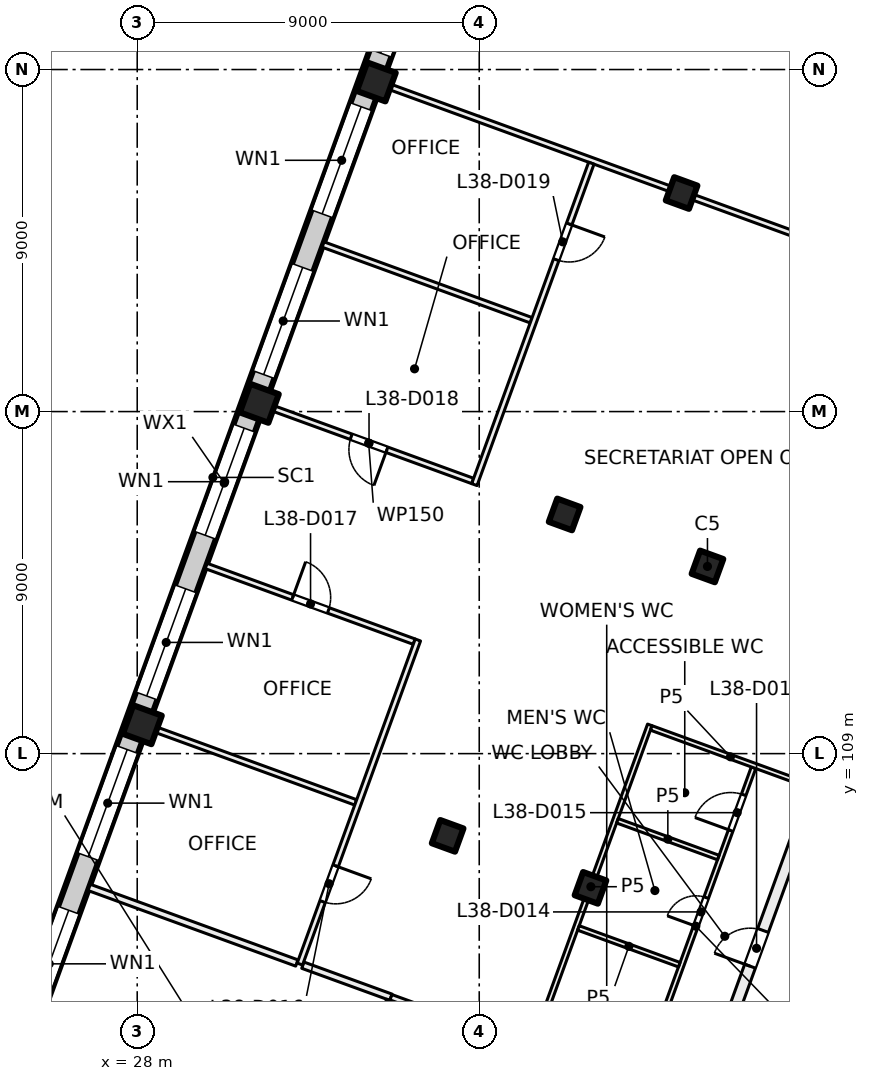
"""IFC4 building model, lengths in metres.
Left out: names, types, materials, properties, quantities, classifications, styles, units other than length and angle.
Written with IfcOpenShell. Run it as: python <this file> out.ifc"""

import sys

from ifc_helpers import new_model, si_unit, direction, frame, frame_2d, origin, origin_2d, place, context, subcontext, project, spatial, rectangle, extrude, element, fill, save


model = new_model("IFC4")
c1 = context("Model", 3, precision=1e-05, world=origin(), true_north=direction((0.0, 1.0)))
c2 = subcontext(c1, "Body", "Model", "MODEL_VIEW")
j1 = project(units=[si_unit("LENGTHUNIT", "METRE"), si_unit("PLANEANGLEUNIT", "RADIAN")], contexts=[c1])
p1 = place(None, origin())
s1 = spatial("IfcSite", under=j1, at=p1, CompositionType="ELEMENT")
p2 = place(p1, origin())
s2 = spatial("IfcBuilding", under=s1, at=p2, CompositionType="ELEMENT")
p3 = place(p2, frame((0.0, 0.0, 162.5)))
s3 = spatial("IfcBuildingStorey", under=s2, at=p3, CompositionType="ELEMENT", Elevation=162.5)
for number, where, z_axis, x_axis in (
    (1, (43.006, 113.925, 0.0), (0.0, 0.0, 1.0), (-0.342, -0.94, 0.0)),
    (2, (39.927, 105.468, 0.0), (0.0, 0.0, 1.0), (-0.342, -0.94, 0.0)),
    (3, (42.325, 123.751, 0.0), (0.0, 0.0, 1.0), (-0.342, -0.94, 0.0)),
    (4, (39.247, 115.293, 0.0), (0.0, 0.0, 1.0), (-0.342, -0.94, 0.0)),
    (5, (36.169, 106.836, 0.0), (0.0, 0.0, 1.0), (-0.342, -0.94, 0.0)),
):
    element("IfcColumn", number, at=place(p3, frame(where, z_axis=z_axis, x_axis=x_axis)), inside=s3, PredefinedType="COLUMN", context=c2, shape_type="SweptSolid", body=[
        extrude(rectangle(XDim=0.65, YDim=0.65, at=origin_2d()), origin(), (0.0, 0.0, 1.0), 4.0),
    ])
for number, where, z_axis, x_axis in (
    (6, (34.291, 126.675, 0.0), (0.0, 0.0, 1.0), (-0.342, -0.94, 0.0)),
    (7, (31.212, 118.218, 0.0), (0.0, 0.0, 1.0), (-0.342, -0.94, 0.0)),
    (8, (28.134, 109.76, 0.0), (0.0, 0.0, 1.0), (-0.342, -0.94, 0.0)),
):
    element("IfcColumn", number, at=place(p3, frame(where, z_axis=z_axis, x_axis=x_axis)), inside=s3, PredefinedType="COLUMN", context=c2, shape_type="SweptSolid", body=[
        extrude(rectangle(XDim=0.8, YDim=0.8, at=origin_2d()), origin(), (0.0, 0.0, 1.0), 4.0),
    ])
p4 = place(p3, frame((52.212, 113.783, 0.0), z_axis=(0.0, 0.0, 1.0), x_axis=(-0.34202521188, -0.939690775968, 0.0)))
e9 = element("IfcWall", 9, at=p4, inside=s3, PredefinedType="SOLIDWALL", context=c2, shape_type="SweptSolid", body=[
    extrude(rectangle(XDim=21.745, YDim=0.6, at=frame_2d((10.873, 0.0))), origin(), (0.0, 0.0, 1.0), 3.625),
])
p5 = place(p4, frame((3.765, 0.0, 0.9)))
e10 = element("IfcOpeningElement", 10, at=p5, cuts=e9, PredefinedType="OPENING", context=c2, shape_type="SweptSolid", body=[
    extrude(rectangle(XDim=3.0, YDim=2.4, at=frame_2d((1.5, 1.2))), frame((0.0, 0.31, 0.0), z_axis=(0.0, -1.0, 0.0), x_axis=(1.0, 0.0, 0.0)), (0.0, 0.0, 1.0), 0.62),
])
p6 = place(p4, frame((8.265, 0.0, 0.9)))
e11 = element("IfcOpeningElement", 11, at=p6, cuts=e9, PredefinedType="OPENING", context=c2, shape_type="SweptSolid", body=[
    extrude(rectangle(XDim=3.0, YDim=2.4, at=frame_2d((1.5, 1.2))), frame((0.0, 0.31, 0.0), z_axis=(0.0, -1.0, 0.0), x_axis=(1.0, 0.0, 0.0)), (0.0, 0.0, 1.0), 0.62),
])
p7 = place(p4, frame((12.765, 0.0, 0.9)))
e12 = element("IfcOpeningElement", 12, at=p7, cuts=e9, PredefinedType="OPENING", context=c2, shape_type="SweptSolid", body=[
    extrude(rectangle(XDim=3.0, YDim=2.4, at=frame_2d((1.5, 1.2))), frame((0.0, 0.31, 0.0), z_axis=(0.0, -1.0, 0.0), x_axis=(1.0, 0.0, 0.0)), (0.0, 0.0, 1.0), 0.62),
])
p8 = place(p4, frame((17.265, 0.0, 0.9)))
e13 = element("IfcOpeningElement", 13, at=p8, cuts=e9, PredefinedType="OPENING", context=c2, shape_type="SweptSolid", body=[
    extrude(rectangle(XDim=3.0, YDim=2.4, at=frame_2d((1.5, 1.2))), frame((0.0, 0.31, 0.0), z_axis=(0.0, -1.0, 0.0), x_axis=(1.0, 0.0, 0.0)), (0.0, 0.0, 1.0), 0.62),
])
p9 = place(p3, frame((24.666, 100.669, 0.0), z_axis=(0.0, 0.0, 1.0), x_axis=(0.34201964167, 0.939692803373, 0.0)))
e14 = element("IfcWall", 14, at=p9, inside=s3, PredefinedType="SOLIDWALL", context=c2, shape_type="SweptSolid", body=[
    extrude(rectangle(XDim=32.884, YDim=0.6, at=frame_2d((16.442, 0.0))), origin(), (0.0, 0.0, 1.0), 3.625),
])
p10 = place(p9, frame((1.48, 0.0, 0.9)))
e15 = element("IfcOpeningElement", 15, at=p10, cuts=e14, PredefinedType="OPENING", context=c2, shape_type="SweptSolid", body=[
    extrude(rectangle(XDim=3.0, YDim=2.4, at=frame_2d((1.5, 1.2))), frame((0.0, 0.31, 0.0), z_axis=(0.0, -1.0, 0.0), x_axis=(1.0, 0.0, 0.0)), (0.0, 0.0, 1.0), 0.62),
])
p11 = place(p9, frame((5.98, 0.0, 0.9)))
e16 = element("IfcOpeningElement", 16, at=p11, cuts=e14, PredefinedType="OPENING", context=c2, shape_type="SweptSolid", body=[
    extrude(rectangle(XDim=3.0, YDim=2.4, at=frame_2d((1.5, 1.2))), frame((0.0, 0.31, 0.0), z_axis=(0.0, -1.0, 0.0), x_axis=(1.0, 0.0, 0.0)), (0.0, 0.0, 1.0), 0.62),
])
p12 = place(p9, frame((10.48, 0.0, 0.9)))
e17 = element("IfcOpeningElement", 17, at=p12, cuts=e14, PredefinedType="OPENING", context=c2, shape_type="SweptSolid", body=[
    extrude(rectangle(XDim=3.0, YDim=2.4, at=frame_2d((1.5, 1.2))), frame((0.0, 0.31, 0.0), z_axis=(0.0, -1.0, 0.0), x_axis=(1.0, 0.0, 0.0)), (0.0, 0.0, 1.0), 0.62),
])
p13 = place(p9, frame((14.98, 0.0, 0.9)))
e18 = element("IfcOpeningElement", 18, at=p13, cuts=e14, PredefinedType="OPENING", context=c2, shape_type="SweptSolid", body=[
    extrude(rectangle(XDim=3.0, YDim=2.4, at=frame_2d((1.5, 1.2))), frame((0.0, 0.31, 0.0), z_axis=(0.0, -1.0, 0.0), x_axis=(1.0, 0.0, 0.0)), (0.0, 0.0, 1.0), 0.62),
])
p14 = place(p9, frame((19.48, 0.0, 0.9)))
e19 = element("IfcOpeningElement", 19, at=p14, cuts=e14, PredefinedType="OPENING", context=c2, shape_type="SweptSolid", body=[
    extrude(rectangle(XDim=3.0, YDim=2.4, at=frame_2d((1.5, 1.2))), frame((0.0, 0.31, 0.0), z_axis=(0.0, -1.0, 0.0), x_axis=(1.0, 0.0, 0.0)), (0.0, 0.0, 1.0), 0.62),
])
p15 = place(p9, frame((23.98, 0.0, 0.9)))
e20 = element("IfcOpeningElement", 20, at=p15, cuts=e14, PredefinedType="OPENING", context=c2, shape_type="SweptSolid", body=[
    extrude(rectangle(XDim=3.0, YDim=2.4, at=frame_2d((1.5, 1.2))), frame((0.0, 0.31, 0.0), z_axis=(0.0, -1.0, 0.0), x_axis=(1.0, 0.0, 0.0)), (0.0, 0.0, 1.0), 0.62),
])
p16 = place(p9, frame((28.48, 0.0, 0.9)))
e21 = element("IfcOpeningElement", 21, at=p16, cuts=e14, PredefinedType="OPENING", context=c2, shape_type="SweptSolid", body=[
    extrude(rectangle(XDim=3.0, YDim=2.4, at=frame_2d((1.5, 1.2))), frame((0.0, 0.31, 0.0), z_axis=(0.0, -1.0, 0.0), x_axis=(1.0, 0.0, 0.0)), (0.0, 0.0, 1.0), 0.62),
])
p17 = place(p3, frame((26.736, 105.48, 0.0), z_axis=(0.0, 0.0, 1.0), x_axis=(0.939674453825, -0.342070052516, 0.0)))
e22 = element("IfcWall", 22, at=p17, inside=s3, PredefinedType="PARTITIONING", context=c2, shape_type="SweptSolid", body=[
    extrude(rectangle(XDim=5.815, YDim=0.175, at=frame_2d((2.907, 0.0))), origin(), (0.0, 0.0, 1.0), 3.625),
])
p18 = place(p3, frame((28.275, 109.709, 0.0), z_axis=(0.0, 0.0, 1.0), x_axis=(0.939718757431, -0.341948324943, 0.0)))
e23 = element("IfcWall", 23, at=p18, inside=s3, PredefinedType="PARTITIONING", context=c2, shape_type="SweptSolid", body=[
    extrude(rectangle(XDim=5.825, YDim=0.15, at=frame_2d((2.913, 0.0))), origin(), (0.0, 0.0, 1.0), 3.625),
])
p19 = place(p3, frame((29.814, 113.938, 0.0), z_axis=(0.0, 0.0, 1.0), x_axis=(0.939738354986, -0.341894463495, 0.0)))
e24 = element("IfcWall", 24, at=p19, inside=s3, PredefinedType="PARTITIONING", context=c2, shape_type="SweptSolid", body=[
    extrude(rectangle(XDim=5.826, YDim=0.15, at=frame_2d((2.913, 0.0))), origin(), (0.0, 0.0, 1.0), 3.625),
])
p20 = place(p19, frame((2.423, 0.0, 0.0)))
e25 = element("IfcOpeningElement", 25, at=p20, cuts=e24, PredefinedType="OPENING", context=c2, shape_type="SweptSolid", body=[
    extrude(rectangle(XDim=1.0, YDim=2.1, at=frame_2d((0.5, 1.05))), frame((0.0, 0.085, 0.0), z_axis=(0.0, -1.0, 0.0), x_axis=(1.0, 0.0, 0.0)), (0.0, 0.0, 1.0), 0.17),
])
p21 = place(p3, frame((32.359, 103.433, 0.0), z_axis=(0.0, 0.0, 1.0), x_axis=(0.939784753685, -0.341766904105, 0.0)))
e26 = element("IfcWall", 26, at=p21, inside=s3, PredefinedType="PARTITIONING", context=c2, shape_type="SweptSolid", body=[
    extrude(rectangle(XDim=2.467, YDim=0.175, at=frame_2d((1.233, 0.0))), origin(), (0.0, 0.0, 1.0), 3.625),
])
p22 = place(p3, frame((32.892, 122.395, 0.0), z_axis=(0.0, 0.0, 1.0), x_axis=(0.939733456466, -0.341907927371, 0.0)))
e27 = element("IfcWall", 27, at=p22, inside=s3, PredefinedType="PARTITIONING", context=c2, shape_type="SweptSolid", body=[
    extrude(rectangle(XDim=5.826, YDim=0.15, at=frame_2d((2.913, 0.0))), origin(), (0.0, 0.0, 1.0), 3.625),
])
p23 = place(p3, frame((34.431, 126.624, 0.0), z_axis=(0.0, 0.0, 1.0), x_axis=(0.939678226331, -0.342059689177, 0.0)))
e28 = element("IfcWall", 28, at=p23, inside=s3, PredefinedType="PARTITIONING", context=c2, shape_type="SweptSolid", body=[
    extrude(rectangle(XDim=16.901, YDim=0.15, at=frame_2d((8.45, 0.0))), origin(), (0.0, 0.0, 1.0), 3.625),
])
p24 = place(p3, frame((32.881, 97.657, 0.0), z_axis=(0.0, 0.0, 1.0), x_axis=(0.342058204353, 0.939678766832, 0.0)))
e29 = element("IfcWall", 29, at=p24, inside=s3, PredefinedType="PARTITIONING", context=c2, shape_type="SweptSolid", body=[
    extrude(rectangle(XDim=5.163, YDim=0.175, at=frame_2d((2.581, 0.0))), origin(), (0.0, 0.0, 1.0), 3.625),
])
p25 = place(p24, frame((1.991, 0.0, 0.0)))
e30 = element("IfcOpeningElement", 30, at=p25, cuts=e29, PredefinedType="OPENING", context=c2, shape_type="SweptSolid", body=[
    extrude(rectangle(XDim=1.2, YDim=2.1, at=frame_2d((0.6, 1.05))), frame((0.0, 0.097, 0.0), z_axis=(0.0, -1.0, 0.0), x_axis=(1.0, 0.0, 0.0)), (0.0, 0.0, 1.0), 0.195),
])
p26 = place(p3, frame((34.677, 102.59, 0.0), z_axis=(0.0, 0.0, 1.0), x_axis=(0.939712759945, -0.341964806371, 0.0)))
e31 = element("IfcWall", 31, at=p26, inside=s3, PredefinedType="PARTITIONING", context=c2, shape_type="SweptSolid", body=[
    extrude(rectangle(XDim=3.889, YDim=0.15, at=frame_2d((1.945, 0.0))), origin(), (0.0, 0.0, 1.0), 3.625),
])
p27 = place(p3, frame((35.385, 111.99, 0.0), z_axis=(0.0, 0.0, 1.0), x_axis=(-0.342153449842, -0.939644090473, 0.0)))
e32 = element("IfcWall", 32, at=p27, inside=s3, PredefinedType="PARTITIONING", context=c2, shape_type="SweptSolid", body=[
    extrude(rectangle(XDim=9.075, YDim=0.15, at=frame_2d((4.537, 0.0))), origin(), (0.0, 0.0, 1.0), 3.625),
])
p28 = place(p27, frame((6.325, 0.0, 0.0)))
e33 = element("IfcOpeningElement", 33, at=p28, cuts=e32, PredefinedType="OPENING", context=c2, shape_type="SweptSolid", body=[
    extrude(rectangle(XDim=1.0, YDim=2.1, at=frame_2d((0.5, 1.05))), frame((0.0, 0.085, 0.0), z_axis=(0.0, -1.0, 0.0), x_axis=(1.0, 0.0, 0.0)), (0.0, 0.0, 1.0), 0.17),
])
p29 = place(p3, frame((36.828, 116.174, 0.0), z_axis=(0.0, 0.0, 1.0), x_axis=(-0.939733456466, 0.341907927371, 0.0)))
e34 = element("IfcWall", 34, at=p29, inside=s3, PredefinedType="PARTITIONING", context=c2, shape_type="SweptSolid", body=[
    extrude(rectangle(XDim=5.826, YDim=0.15, at=frame_2d((2.913, 0.0))), origin(), (0.0, 0.0, 1.0), 3.625),
])
p30 = place(p29, frame((2.403, 0.0, 0.0)))
e35 = element("IfcOpeningElement", 35, at=p30, cuts=e34, PredefinedType="OPENING", context=c2, shape_type="SweptSolid", body=[
    extrude(rectangle(XDim=1.0, YDim=2.1, at=frame_2d((0.5, 1.05))), frame((0.0, 0.085, 0.0), z_axis=(0.0, -1.0, 0.0), x_axis=(1.0, 0.0, 0.0)), (0.0, 0.0, 1.0), 0.17),
])
p31 = place(p3, frame((39.95, 124.536, 0.0), z_axis=(0.0, 0.0, 1.0), x_axis=(-0.341963022424, -0.939713409128, 0.0)))
e36 = element("IfcWall", 36, at=p31, inside=s3, PredefinedType="PARTITIONING", context=c2, shape_type="SweptSolid", body=[
    extrude(rectangle(XDim=9.001, YDim=0.15, at=frame_2d((4.5, 0.0))), origin(), (0.0, 0.0, 1.0), 3.625),
])
p32 = place(p31, frame((1.703, 0.0, 0.0)))
e37 = element("IfcOpeningElement", 37, at=p32, cuts=e36, PredefinedType="OPENING", context=c2, shape_type="SweptSolid", body=[
    extrude(rectangle(XDim=1.0, YDim=2.1, at=frame_2d((0.5, 1.05))), frame((0.0, 0.085, 0.0), z_axis=(0.0, -1.0, 0.0), x_axis=(1.0, 0.0, 0.0)), (0.0, 0.0, 1.0), 0.17),
])
p33 = place(p3, frame((38.388, 101.24, 0.0), z_axis=(0.0, 0.0, 1.0), x_axis=(0.342067486799, 0.93967538782, 0.0)))
e38 = element("IfcWall", 38, at=p33, inside=s3, PredefinedType="PARTITIONING", context=c2, shape_type="SweptSolid", body=[
    extrude(rectangle(XDim=9.063, YDim=0.125, at=frame_2d((4.531, 0.0))), origin(), (0.0, 0.0, 1.0), 3.625),
])
p34 = place(p3, frame((41.181, 100.29, 0.0), z_axis=(0.0, 0.0, 1.0), x_axis=(0.34222012082, 0.939619810831, 0.0)))
e39 = element("IfcWall", 39, at=p34, inside=s3, PredefinedType="PARTITIONING", context=c2, shape_type="SweptSolid", body=[
    extrude(rectangle(XDim=8.875, YDim=0.125, at=frame_2d((4.438, 0.0))), origin(), (0.0, 0.0, 1.0), 3.625),
])
p35 = place(p34, frame((1.258, 0.0, 0.0)))
e40 = element("IfcOpeningElement", 40, at=p35, cuts=e39, PredefinedType="OPENING", context=c2, shape_type="SweptSolid", body=[
    extrude(rectangle(XDim=0.8, YDim=2.1, at=frame_2d((0.4, 1.05))), frame((0.0, 0.073, 0.0), z_axis=(0.0, -1.0, 0.0), x_axis=(1.0, 0.0, 0.0)), (0.0, 0.0, 1.0), 0.145),
])
p36 = place(p34, frame((4.437, 0.0, 0.0)))
e41 = element("IfcOpeningElement", 41, at=p36, cuts=e39, PredefinedType="OPENING", context=c2, shape_type="SweptSolid", body=[
    extrude(rectangle(XDim=0.8, YDim=2.1, at=frame_2d((0.4, 1.05))), frame((0.0, 0.073, 0.0), z_axis=(0.0, -1.0, 0.0), x_axis=(1.0, 0.0, 0.0)), (0.0, 0.0, 1.0), 0.145),
])
p37 = place(p34, frame((7.116, 0.0, 0.0)))
e42 = element("IfcOpeningElement", 42, at=p37, cuts=e39, PredefinedType="OPENING", context=c2, shape_type="SweptSolid", body=[
    extrude(rectangle(XDim=1.0, YDim=2.1, at=frame_2d((0.5, 1.05))), frame((0.0, 0.073, 0.0), z_axis=(0.0, -1.0, 0.0), x_axis=(1.0, 0.0, 0.0)), (0.0, 0.0, 1.0), 0.145),
])
p38 = place(p3, frame((41.526, 109.676, 0.0), z_axis=(0.0, 0.0, 1.0), x_axis=(0.939577975992, -0.342334963203, 0.0)))
e43 = element("IfcWall", 43, at=p38, inside=s3, PredefinedType="PARTITIONING", context=c2, shape_type="SweptSolid", body=[
    extrude(rectangle(XDim=4.437, YDim=0.125, at=frame_2d((2.219, 0.0))), origin(), (0.0, 0.0, 1.0), 3.625),
])
p39 = place(p3, frame((42.264, 103.446, 0.0), z_axis=(0.0, 0.0, 1.0), x_axis=(-0.939563555473, 0.342374539396, 0.0)))
e44 = element("IfcWall", 44, at=p39, inside=s3, PredefinedType="PARTITIONING", context=c2, shape_type="SweptSolid", body=[
    extrude(rectangle(XDim=2.824, YDim=0.125, at=frame_2d((1.412, 0.0))), origin(), (0.0, 0.0, 1.0), 3.625),
])
p40 = place(p3, frame((42.737, 99.59, 0.0), z_axis=(0.0, 0.0, 1.0), x_axis=(0.341992703977, 0.939702607438, 0.0)))
e45 = element("IfcWall", 45, at=p40, inside=s3, PredefinedType="PARTITIONING", context=c2, shape_type="SweptSolid", body=[
    extrude(rectangle(XDim=23.006, YDim=0.3, at=frame_2d((11.503, 0.0))), origin(), (0.0, 0.0, 1.0), 3.625),
])
p41 = place(p40, frame((4.062, 0.0, 0.0)))
e46 = element("IfcOpeningElement", 46, at=p41, cuts=e45, PredefinedType="OPENING", context=c2, shape_type="SweptSolid", body=[
    extrude(rectangle(XDim=1.0, YDim=2.1, at=frame_2d((0.5, 1.05))), frame((0.0, 0.16, 0.0), z_axis=(0.0, -1.0, 0.0), x_axis=(1.0, 0.0, 0.0)), (0.0, 0.0, 1.0), 0.32),
])
p42 = place(p40, frame((14.912, 0.0, 0.0)))
e47 = element("IfcOpeningElement", 47, at=p42, cuts=e45, PredefinedType="OPENING", context=c2, shape_type="SweptSolid", body=[
    extrude(rectangle(XDim=1.8, YDim=2.1, at=frame_2d((0.9, 1.05))), frame((0.0, 0.16, 0.0), z_axis=(0.0, -1.0, 0.0), x_axis=(1.0, 0.0, 0.0)), (0.0, 0.0, 1.0), 0.32),
])
p43 = place(p3, frame((43.29, 106.266, 0.0), z_axis=(0.0, 0.0, 1.0), x_axis=(-0.939601484935, 0.342270433294, 0.0)))
e48 = element("IfcWall", 48, at=p43, inside=s3, PredefinedType="PARTITIONING", context=c2, shape_type="SweptSolid", body=[
    extrude(rectangle(XDim=2.825, YDim=0.125, at=frame_2d((1.412, 0.0))), origin(), (0.0, 0.0, 1.0), 3.625),
])
p44 = place(p10, origin())
e49 = element("IfcWindow", 49, at=p44, inside=s3, PartitioningType="SINGLE_PANEL", PredefinedType="WINDOW", context=c2, shape_type="SweptSolid", body=[
    extrude(rectangle(XDim=3.0, YDim=2.4, at=frame_2d((1.5, 1.2))), frame((0.0, 0.03, 0.0), z_axis=(0.0, -1.0, 0.0), x_axis=(1.0, 0.0, 0.0)), (0.0, 0.0, 1.0), 0.06),
])
fill(e15, e49)
p45 = place(p11, origin())
e50 = element("IfcWindow", 50, at=p45, inside=s3, PartitioningType="SINGLE_PANEL", PredefinedType="WINDOW", context=c2, shape_type="SweptSolid", body=[
    extrude(rectangle(XDim=3.0, YDim=2.4, at=frame_2d((1.5, 1.2))), frame((0.0, 0.03, 0.0), z_axis=(0.0, -1.0, 0.0), x_axis=(1.0, 0.0, 0.0)), (0.0, 0.0, 1.0), 0.06),
])
fill(e16, e50)
p46 = place(p12, origin())
e51 = element("IfcWindow", 51, at=p46, inside=s3, PartitioningType="SINGLE_PANEL", PredefinedType="WINDOW", context=c2, shape_type="SweptSolid", body=[
    extrude(rectangle(XDim=3.0, YDim=2.4, at=frame_2d((1.5, 1.2))), frame((0.0, 0.03, 0.0), z_axis=(0.0, -1.0, 0.0), x_axis=(1.0, 0.0, 0.0)), (0.0, 0.0, 1.0), 0.06),
])
fill(e17, e51)
p47 = place(p13, origin())
e52 = element("IfcWindow", 52, at=p47, inside=s3, PartitioningType="SINGLE_PANEL", PredefinedType="WINDOW", context=c2, shape_type="SweptSolid", body=[
    extrude(rectangle(XDim=3.0, YDim=2.4, at=frame_2d((1.5, 1.2))), frame((0.0, 0.03, 0.0), z_axis=(0.0, -1.0, 0.0), x_axis=(1.0, 0.0, 0.0)), (0.0, 0.0, 1.0), 0.06),
])
fill(e18, e52)
p48 = place(p14, origin())
e53 = element("IfcWindow", 53, at=p48, inside=s3, PartitioningType="SINGLE_PANEL", PredefinedType="WINDOW", context=c2, shape_type="SweptSolid", body=[
    extrude(rectangle(XDim=3.0, YDim=2.4, at=frame_2d((1.5, 1.2))), frame((0.0, 0.03, 0.0), z_axis=(0.0, -1.0, 0.0), x_axis=(1.0, 0.0, 0.0)), (0.0, 0.0, 1.0), 0.06),
])
fill(e19, e53)
p49 = place(p15, origin())
e54 = element("IfcWindow", 54, at=p49, inside=s3, PartitioningType="SINGLE_PANEL", PredefinedType="WINDOW", context=c2, shape_type="SweptSolid", body=[
    extrude(rectangle(XDim=3.0, YDim=2.4, at=frame_2d((1.5, 1.2))), frame((0.0, 0.03, 0.0), z_axis=(0.0, -1.0, 0.0), x_axis=(1.0, 0.0, 0.0)), (0.0, 0.0, 1.0), 0.06),
])
fill(e20, e54)
p50 = place(p16, origin())
e55 = element("IfcWindow", 55, at=p50, inside=s3, PartitioningType="SINGLE_PANEL", PredefinedType="WINDOW", context=c2, shape_type="SweptSolid", body=[
    extrude(rectangle(XDim=3.0, YDim=2.4, at=frame_2d((1.5, 1.2))), frame((0.0, 0.03, 0.0), z_axis=(0.0, -1.0, 0.0), x_axis=(1.0, 0.0, 0.0)), (0.0, 0.0, 1.0), 0.06),
])
fill(e21, e55)
p51 = place(p41, origin())
e56 = element("IfcDoor", 56, at=p51, inside=s3, OperationType="SINGLE_SWING_LEFT", PredefinedType="DOOR", context=c2, shape_type="SweptSolid", body=[
    extrude(rectangle(XDim=1.0, YDim=2.1, at=frame_2d((0.5, 1.05))), frame((0.0, 0.025, 0.0), z_axis=(0.0, -1.0, 0.0), x_axis=(1.0, 0.0, 0.0)), (0.0, 0.0, 1.0), 0.05),
])
fill(e46, e56)
p52 = place(p36, origin())
e57 = element("IfcDoor", 57, at=p52, inside=s3, OperationType="SINGLE_SWING_LEFT", PredefinedType="DOOR", context=c2, shape_type="SweptSolid", body=[
    extrude(rectangle(XDim=0.8, YDim=2.1, at=frame_2d((0.4, 1.05))), frame((0.0, 0.025, 0.0), z_axis=(0.0, -1.0, 0.0), x_axis=(1.0, 0.0, 0.0)), (0.0, 0.0, 1.0), 0.05),
])
fill(e41, e57)
p53 = place(p37, origin())
e58 = element("IfcDoor", 58, at=p53, inside=s3, OperationType="SINGLE_SWING_LEFT", PredefinedType="DOOR", context=c2, shape_type="SweptSolid", body=[
    extrude(rectangle(XDim=1.0, YDim=2.1, at=frame_2d((0.5, 1.05))), frame((0.0, 0.025, 0.0), z_axis=(0.0, -1.0, 0.0), x_axis=(1.0, 0.0, 0.0)), (0.0, 0.0, 1.0), 0.05),
])
fill(e42, e58)
p54 = place(p28, origin())
e59 = element("IfcDoor", 59, at=p54, inside=s3, OperationType="SINGLE_SWING_LEFT", PredefinedType="DOOR", context=c2, shape_type="SweptSolid", body=[
    extrude(rectangle(XDim=1.0, YDim=2.1, at=frame_2d((0.5, 1.05))), frame((0.0, 0.025, 0.0), z_axis=(0.0, -1.0, 0.0), x_axis=(1.0, 0.0, 0.0)), (0.0, 0.0, 1.0), 0.05),
])
fill(e33, e59)
p55 = place(p20, origin())
e60 = element("IfcDoor", 60, at=p55, inside=s3, OperationType="SINGLE_SWING_LEFT", PredefinedType="DOOR", context=c2, shape_type="SweptSolid", body=[
    extrude(rectangle(XDim=1.0, YDim=2.1, at=frame_2d((0.5, 1.05))), frame((0.0, 0.025, 0.0), z_axis=(0.0, -1.0, 0.0), x_axis=(1.0, 0.0, 0.0)), (0.0, 0.0, 1.0), 0.05),
])
fill(e25, e60)
p56 = place(p30, origin())
e61 = element("IfcDoor", 61, at=p56, inside=s3, OperationType="SINGLE_SWING_RIGHT", PredefinedType="DOOR", context=c2, shape_type="SweptSolid", body=[
    extrude(rectangle(XDim=1.0, YDim=2.1, at=frame_2d((0.5, 1.05))), frame((0.0, 0.025, 0.0), z_axis=(0.0, -1.0, 0.0), x_axis=(1.0, 0.0, 0.0)), (0.0, 0.0, 1.0), 0.05),
])
fill(e35, e61)
p57 = place(p32, origin())
e62 = element("IfcDoor", 62, at=p57, inside=s3, OperationType="SINGLE_SWING_LEFT", PredefinedType="DOOR", context=c2, shape_type="SweptSolid", body=[
    extrude(rectangle(XDim=1.0, YDim=2.1, at=frame_2d((0.5, 1.05))), frame((0.0, 0.025, 0.0), z_axis=(0.0, -1.0, 0.0), x_axis=(1.0, 0.0, 0.0)), (0.0, 0.0, 1.0), 0.05),
])
fill(e37, e62)
save(model, sys.argv[1])
